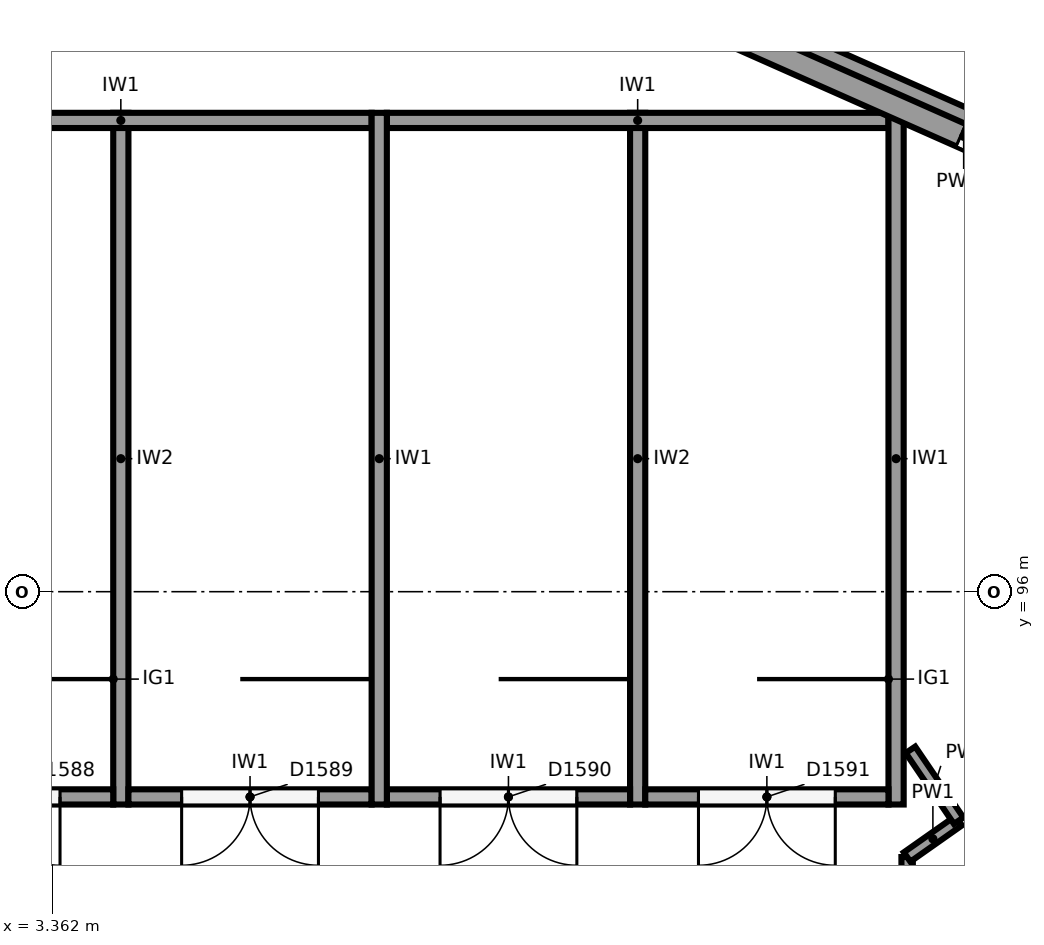
"""IFC4 building model, lengths in metres.
Left out: names, types, materials, properties, quantities, classifications, styles, units other than length and angle.
Written with IfcOpenShell. Run it as: python <this file> out.ifc"""

import sys

from ifc_helpers import new_model, si_unit, direction, frame, frame_2d, origin, place, context, subcontext, project, spatial, polyline, rectangle, outline, extrude, element, fill, save


model = new_model("IFC4")
c1 = context("Model", 3, precision=1e-05, world=origin(), true_north=direction((0.0, 1.0)))
c2 = subcontext(c1, "Body", "Model", "MODEL_VIEW")
j1 = project(units=[si_unit("LENGTHUNIT", "METRE"), si_unit("PLANEANGLEUNIT", "RADIAN")], contexts=[c1])
p1 = place(None, origin())
s1 = spatial("IfcSite", under=j1, at=p1, CompositionType="ELEMENT")
p2 = place(p1, origin())
s2 = spatial("IfcBuilding", under=s1, at=p2, CompositionType="ELEMENT")
p3 = place(p2, frame((0.0, 0.0, 24.0)))
s3 = spatial("IfcBuildingStorey", under=s2, at=p3, CompositionType="ELEMENT", Elevation=24.0)
p4 = place(p3, frame((8.123, 105.198, 0.0), z_axis=(0.0, 0.0, 1.0), x_axis=(0.914138897099, -0.405401130748, 0.0)))
e1 = element("IfcWall", 1, at=p4, inside=s3, PredefinedType="SOLIDWALL", context=c2, shape_type="SweptSolid", body=[
    extrude(rectangle(XDim=15.824, YDim=0.32, at=frame_2d((7.912, 0.0))), origin(), (0.0, 0.0, 1.0), 6.0),
])
p5 = place(p4, frame((14.174, 0.0, 1.0)))
e2 = element("IfcOpeningElement", 2, at=p5, cuts=e1, PredefinedType="OPENING", context=c2, shape_type="SweptSolid", body=[
    extrude(rectangle(XDim=0.9, YDim=3.25, at=frame_2d((0.45, 1.625))), frame((0.0, 0.17, 0.0), z_axis=(0.0, -1.0, 0.0), x_axis=(1.0, 0.0, 0.0)), (0.0, 0.0, 1.0), 0.34),
])
p6 = place(p4, frame((12.074, 0.0, 1.0)))
e3 = element("IfcOpeningElement", 3, at=p6, cuts=e1, PredefinedType="OPENING", context=c2, shape_type="SweptSolid", body=[
    extrude(rectangle(XDim=0.9, YDim=3.25, at=frame_2d((0.45, 1.625))), frame((0.0, 0.17, 0.0), z_axis=(0.0, -1.0, 0.0), x_axis=(1.0, 0.0, 0.0)), (0.0, 0.0, 1.0), 0.34),
])
p7 = place(p4, frame((9.974, 0.0, 1.0)))
e4 = element("IfcOpeningElement", 4, at=p7, cuts=e1, PredefinedType="OPENING", context=c2, shape_type="SweptSolid", body=[
    extrude(rectangle(XDim=0.9, YDim=3.25, at=frame_2d((0.45, 1.625))), frame((0.0, 0.17, 0.0), z_axis=(0.0, -1.0, 0.0), x_axis=(1.0, 0.0, 0.0)), (0.0, 0.0, 1.0), 0.34),
])
p8 = place(p4, frame((7.874, 0.0, 1.0)))
e5 = element("IfcOpeningElement", 5, at=p8, cuts=e1, PredefinedType="OPENING", context=c2, shape_type="SweptSolid", body=[
    extrude(rectangle(XDim=0.9, YDim=3.25, at=frame_2d((0.45, 1.625))), frame((0.0, 0.17, 0.0), z_axis=(0.0, -1.0, 0.0), x_axis=(1.0, 0.0, 0.0)), (0.0, 0.0, 1.0), 0.34),
])
p9 = place(p3, frame((8.204, 105.38, 6.0), z_axis=(0.0, 0.0, 1.0), x_axis=(0.914138897099, -0.405401130748, 0.0)))
e6 = element("IfcWall", 6, at=p9, inside=s3, PredefinedType="SOLIDWALL", context=c2, shape_type="SweptSolid", body=[
    extrude(outline(polyline([(0.0, 0.0), (15.824, 0.0), (15.824, 4.072), (0.0, 10.488), (0.0, 0.0)])), frame((0.0, 0.16, 0.0), z_axis=(0.0, -1.0, 0.0), x_axis=(1.0, 0.0, 0.0)), (0.0, 0.0, 1.0), 0.32),
])
p10 = place(p9, frame((9.974, 0.0, 1.6)))
e7 = element("IfcOpeningElement", 7, at=p10, cuts=e6, PredefinedType="OPENING", context=c2, shape_type="SweptSolid", body=[
    extrude(rectangle(XDim=0.9, YDim=3.0, at=frame_2d((0.45, 1.5))), frame((0.0, 0.17, 0.0), z_axis=(0.0, -1.0, 0.0), x_axis=(1.0, 0.0, 0.0)), (0.0, 0.0, 1.0), 0.34),
])
p11 = place(p9, frame((7.874, 0.0, 1.6)))
e8 = element("IfcOpeningElement", 8, at=p11, cuts=e6, PredefinedType="OPENING", context=c2, shape_type="SweptSolid", body=[
    extrude(rectangle(XDim=0.9, YDim=3.0, at=frame_2d((0.45, 1.5))), frame((0.0, 0.17, 0.0), z_axis=(0.0, -1.0, 0.0), x_axis=(1.0, 0.0, 0.0)), (0.0, 0.0, 1.0), 0.34),
])
p12 = place(p3, frame((-1.852, 101.397, 0.0), z_axis=(0.0, 0.0, 1.0), x_axis=(0.914133039962, 0.405414337745, 0.0)))
e9 = element("IfcWall", 9, at=p12, inside=s3, PredefinedType="SOLIDWALL", context=c2, shape_type="SweptSolid", body=[
    extrude(rectangle(XDim=9.824, YDim=0.32, at=frame_2d((4.912, 0.0))), origin(), (0.0, 0.0, 1.0), 6.0),
])
p13 = place(p12, frame((1.05, 0.0, 1.0)))
e10 = element("IfcOpeningElement", 10, at=p13, cuts=e9, PredefinedType="OPENING", context=c2, shape_type="SweptSolid", body=[
    extrude(rectangle(XDim=0.9, YDim=3.25, at=frame_2d((0.45, 1.625))), frame((0.0, 0.17, 0.0), z_axis=(0.0, -1.0, 0.0), x_axis=(1.0, 0.0, 0.0)), (0.0, 0.0, 1.0), 0.34),
])
p14 = place(p3, frame((-1.852, 101.397, 6.0), z_axis=(0.0, 0.0, 1.0), x_axis=(0.914133039962, 0.405414337745, 0.0)))
e11 = element("IfcWall", 11, at=p14, inside=s3, PredefinedType="SOLIDWALL", context=c2, shape_type="SweptSolid", body=[
    extrude(outline(polyline([(0.0, 0.0), (9.824, 0.0), (9.824, 10.488), (0.0, 6.505), (0.0, 0.0)])), frame((0.0, 0.16, 0.0), z_axis=(0.0, -1.0, 0.0), x_axis=(1.0, 0.0, 0.0)), (0.0, 0.0, 1.0), 0.32),
])
p15 = place(p14, frame((1.05, 0.0, 1.6)))
e12 = element("IfcOpeningElement", 12, at=p15, cuts=e11, PredefinedType="OPENING", context=c2, shape_type="SweptSolid", body=[
    extrude(rectangle(XDim=0.9, YDim=3.0, at=frame_2d((0.45, 1.5))), frame((0.0, 0.17, 0.0), z_axis=(0.0, -1.0, 0.0), x_axis=(1.0, 0.0, 0.0)), (0.0, 0.0, 1.0), 0.34),
])
for number, where, z_axis, x_axis in (
    (13, (14.467, 102.3, 0.0), (0.0, 0.0, 1.0), (0.0, -1.0, 0.0)),
    (14, (7.667, 102.3, 0.0), (0.0, 0.0, 1.0), (0.0, -1.0, 0.0)),
):
    element("IfcWall", number, at=place(p3, frame(where, z_axis=z_axis, x_axis=x_axis)), inside=s3, PredefinedType="SHEAR", context=c2, shape_type="SweptSolid", body=[
        extrude(rectangle(XDim=9.1, YDim=0.2, at=frame_2d((4.55, 0.0))), origin(), (0.0, 0.0, 1.0), 5.75),
    ])
p16 = place(p3, frame((14.367, 102.2, 0.0), z_axis=(0.0, 0.0, 1.0), x_axis=(-1.0, 0.0, 0.0)))
e15 = element("IfcWall", 15, at=p16, inside=s3, PredefinedType="SHEAR", context=c2, shape_type="SweptSolid", body=[
    extrude(rectangle(XDim=6.6, YDim=0.2, at=frame_2d((3.3, 0.0))), origin(), (0.0, 0.0, 1.0), 5.75),
])
p17 = place(p3, frame((7.567, 102.2, 0.0), z_axis=(0.0, 0.0, 1.0), x_axis=(-1.0, 0.0, 0.0)))
e16 = element("IfcWall", 16, at=p17, inside=s3, PredefinedType="SHEAR", context=c2, shape_type="SweptSolid", body=[
    extrude(rectangle(XDim=6.6, YDim=0.2, at=frame_2d((3.3, 0.0))), origin(), (0.0, 0.0, 1.0), 5.75),
])
for number, where, z_axis, x_axis in (
    (17, (11.067, 102.3, 0.0), (0.0, 0.0, 1.0), (0.0, -1.0, 0.0)),
    (18, (4.267, 102.3, 0.0), (0.0, 0.0, 1.0), (0.0, -1.0, 0.0)),
):
    element("IfcWall", number, at=place(p3, frame(where, z_axis=z_axis, x_axis=x_axis)), inside=s3, PredefinedType="SHEAR", context=c2, shape_type="SweptSolid", body=[
        extrude(rectangle(XDim=9.1, YDim=0.2, at=frame_2d((4.55, 0.0))), origin(), (0.0, 0.0, 1.0), 5.75),
    ])
p18 = place(p3, frame((14.367, 93.3, 0.0), z_axis=(0.0, 0.0, 1.0), x_axis=(-1.0, 0.0, 0.0)))
e19 = element("IfcWall", 19, at=p18, inside=s3, PredefinedType="SHEAR", context=c2, shape_type="SweptSolid", body=[
    extrude(rectangle(XDim=3.2, YDim=0.2, at=frame_2d((1.6, 0.0))), origin(), (0.0, 0.0, 1.0), 5.75),
])
p19 = place(p18, frame((0.7, 0.0, 0.0)))
e20 = element("IfcOpeningElement", 20, at=p19, cuts=e19, PredefinedType="OPENING", context=c2, shape_type="SweptSolid", body=[
    extrude(rectangle(XDim=1.8, YDim=2.1, at=frame_2d((0.9, 1.05))), frame((0.0, 0.11, 0.0), z_axis=(0.0, -1.0, 0.0), x_axis=(1.0, 0.0, 0.0)), (0.0, 0.0, 1.0), 0.22),
])
p20 = place(p3, frame((10.967, 93.3, 0.0), z_axis=(0.0, 0.0, 1.0), x_axis=(-1.0, 0.0, 0.0)))
e21 = element("IfcWall", 21, at=p20, inside=s3, PredefinedType="SHEAR", context=c2, shape_type="SweptSolid", body=[
    extrude(rectangle(XDim=3.2, YDim=0.2, at=frame_2d((1.6, 0.0))), origin(), (0.0, 0.0, 1.0), 5.75),
])
p21 = place(p20, frame((0.7, 0.0, 0.0)))
e22 = element("IfcOpeningElement", 22, at=p21, cuts=e21, PredefinedType="OPENING", context=c2, shape_type="SweptSolid", body=[
    extrude(rectangle(XDim=1.8, YDim=2.1, at=frame_2d((0.9, 1.05))), frame((0.0, 0.11, 0.0), z_axis=(0.0, -1.0, 0.0), x_axis=(1.0, 0.0, 0.0)), (0.0, 0.0, 1.0), 0.22),
])
p22 = place(p3, frame((7.567, 93.3, 0.0), z_axis=(0.0, 0.0, 1.0), x_axis=(-1.0, 0.0, 0.0)))
e23 = element("IfcWall", 23, at=p22, inside=s3, PredefinedType="SHEAR", context=c2, shape_type="SweptSolid", body=[
    extrude(rectangle(XDim=3.2, YDim=0.2, at=frame_2d((1.6, 0.0))), origin(), (0.0, 0.0, 1.0), 5.75),
])
p23 = place(p22, frame((0.7, 0.0, 0.0)))
e24 = element("IfcOpeningElement", 24, at=p23, cuts=e23, PredefinedType="OPENING", context=c2, shape_type="SweptSolid", body=[
    extrude(rectangle(XDim=1.8, YDim=2.1, at=frame_2d((0.9, 1.05))), frame((0.0, 0.11, 0.0), z_axis=(0.0, -1.0, 0.0), x_axis=(1.0, 0.0, 0.0)), (0.0, 0.0, 1.0), 0.22),
])
p24 = place(p3, frame((4.167, 93.3, 0.0), z_axis=(0.0, 0.0, 1.0), x_axis=(-1.0, 0.0, 0.0)))
e25 = element("IfcWall", 25, at=p24, inside=s3, PredefinedType="SHEAR", context=c2, shape_type="SweptSolid", body=[
    extrude(rectangle(XDim=3.2, YDim=0.2, at=frame_2d((1.6, 0.0))), origin(), (0.0, 0.0, 1.0), 5.75),
])
p25 = place(p24, frame((0.7, 0.0, 0.0)))
e26 = element("IfcOpeningElement", 26, at=p25, cuts=e25, PredefinedType="OPENING", context=c2, shape_type="SweptSolid", body=[
    extrude(rectangle(XDim=1.8, YDim=2.1, at=frame_2d((0.9, 1.05))), frame((0.0, 0.11, 0.0), z_axis=(0.0, -1.0, 0.0), x_axis=(1.0, 0.0, 0.0)), (0.0, 0.0, 1.0), 0.22),
])
p26 = place(p3, frame((14.642, 87.142, 0.0), z_axis=(0.0, 0.0, 1.0), x_axis=(-0.005639862998, 0.999984095846, 0.0)))
e27 = element("IfcWall", 27, at=p26, inside=s3, PredefinedType="PARTITIONING", context=c2, shape_type="SweptSolid", body=[
    extrude(rectangle(XDim=5.368, YDim=0.15, at=frame_2d((2.684, 0.0))), origin(), (0.0, 0.0, 1.0), 5.4),
])
p27 = place(p26, frame((1.55, 0.0, 0.0)))
e28 = element("IfcOpeningElement", 28, at=p27, cuts=e27, PredefinedType="OPENING", context=c2, shape_type="SweptSolid", body=[
    extrude(rectangle(XDim=1.8, YDim=2.1, at=frame_2d((0.9, 1.05))), frame((0.0, 0.085, 0.0), z_axis=(0.0, -1.0, 0.0), x_axis=(1.0, 0.0, 0.0)), (0.0, 0.0, 1.0), 0.17),
])
p28 = place(p3, frame((14.612, 92.51, 0.0), z_axis=(0.0, 0.0, 1.0), x_axis=(0.817888493872, 0.575376756214, 0.0)))
e29 = element("IfcWall", 29, at=p28, inside=s3, PredefinedType="PARTITIONING", context=c2, shape_type="SweptSolid", body=[
    extrude(rectangle(XDim=0.83, YDim=0.15, at=frame_2d((0.415, 0.0))), origin(), (0.0, 0.0, 1.0), 5.4),
])
p29 = place(p3, frame((15.29, 92.987, 0.0), z_axis=(0.0, 0.0, 1.0), x_axis=(-0.562120553728, 0.827055308354, 0.0)))
e30 = element("IfcWall", 30, at=p29, inside=s3, PredefinedType="PARTITIONING", context=c2, shape_type="SweptSolid", body=[
    extrude(rectangle(XDim=1.128, YDim=0.15, at=frame_2d((0.564, 0.0))), origin(), (0.0, 0.0, 1.0), 5.4),
])
p30 = place(p8, origin())
e31 = element("IfcWindow", 31, at=p30, inside=s3, PartitioningType="SINGLE_PANEL", PredefinedType="WINDOW", context=c2, shape_type="SweptSolid", body=[
    extrude(rectangle(XDim=0.9, YDim=3.25, at=frame_2d((0.45, 1.625))), frame((0.0, 0.03, 0.0), z_axis=(0.0, -1.0, 0.0), x_axis=(1.0, 0.0, 0.0)), (0.0, 0.0, 1.0), 0.06),
])
fill(e5, e31)
p31 = place(p19, origin())
e32 = element("IfcDoor", 32, at=p31, inside=s3, OperationType="DOUBLE_DOOR_SINGLE_SWING", PredefinedType="DOOR", context=c2, shape_type="SweptSolid", body=[
    extrude(rectangle(XDim=1.8, YDim=2.1, at=frame_2d((0.9, 1.05))), frame((0.0, 0.025, 0.0), z_axis=(0.0, -1.0, 0.0), x_axis=(1.0, 0.0, 0.0)), (0.0, 0.0, 1.0), 0.05),
])
fill(e20, e32)
p32 = place(p21, origin())
e33 = element("IfcDoor", 33, at=p32, inside=s3, OperationType="DOUBLE_DOOR_SINGLE_SWING", PredefinedType="DOOR", context=c2, shape_type="SweptSolid", body=[
    extrude(rectangle(XDim=1.8, YDim=2.1, at=frame_2d((0.9, 1.05))), frame((0.0, 0.025, 0.0), z_axis=(0.0, -1.0, 0.0), x_axis=(1.0, 0.0, 0.0)), (0.0, 0.0, 1.0), 0.05),
])
fill(e22, e33)
p33 = place(p23, origin())
e34 = element("IfcDoor", 34, at=p33, inside=s3, OperationType="DOUBLE_DOOR_SINGLE_SWING", PredefinedType="DOOR", context=c2, shape_type="SweptSolid", body=[
    extrude(rectangle(XDim=1.8, YDim=2.1, at=frame_2d((0.9, 1.05))), frame((0.0, 0.025, 0.0), z_axis=(0.0, -1.0, 0.0), x_axis=(1.0, 0.0, 0.0)), (0.0, 0.0, 1.0), 0.05),
])
fill(e24, e34)
p34 = place(p25, origin())
e35 = element("IfcDoor", 35, at=p34, inside=s3, OperationType="DOUBLE_DOOR_SINGLE_SWING", PredefinedType="DOOR", context=c2, shape_type="SweptSolid", body=[
    extrude(rectangle(XDim=1.8, YDim=2.1, at=frame_2d((0.9, 1.05))), frame((0.0, 0.025, 0.0), z_axis=(0.0, -1.0, 0.0), x_axis=(1.0, 0.0, 0.0)), (0.0, 0.0, 1.0), 0.05),
])
fill(e26, e35)
save(model, sys.argv[1])
